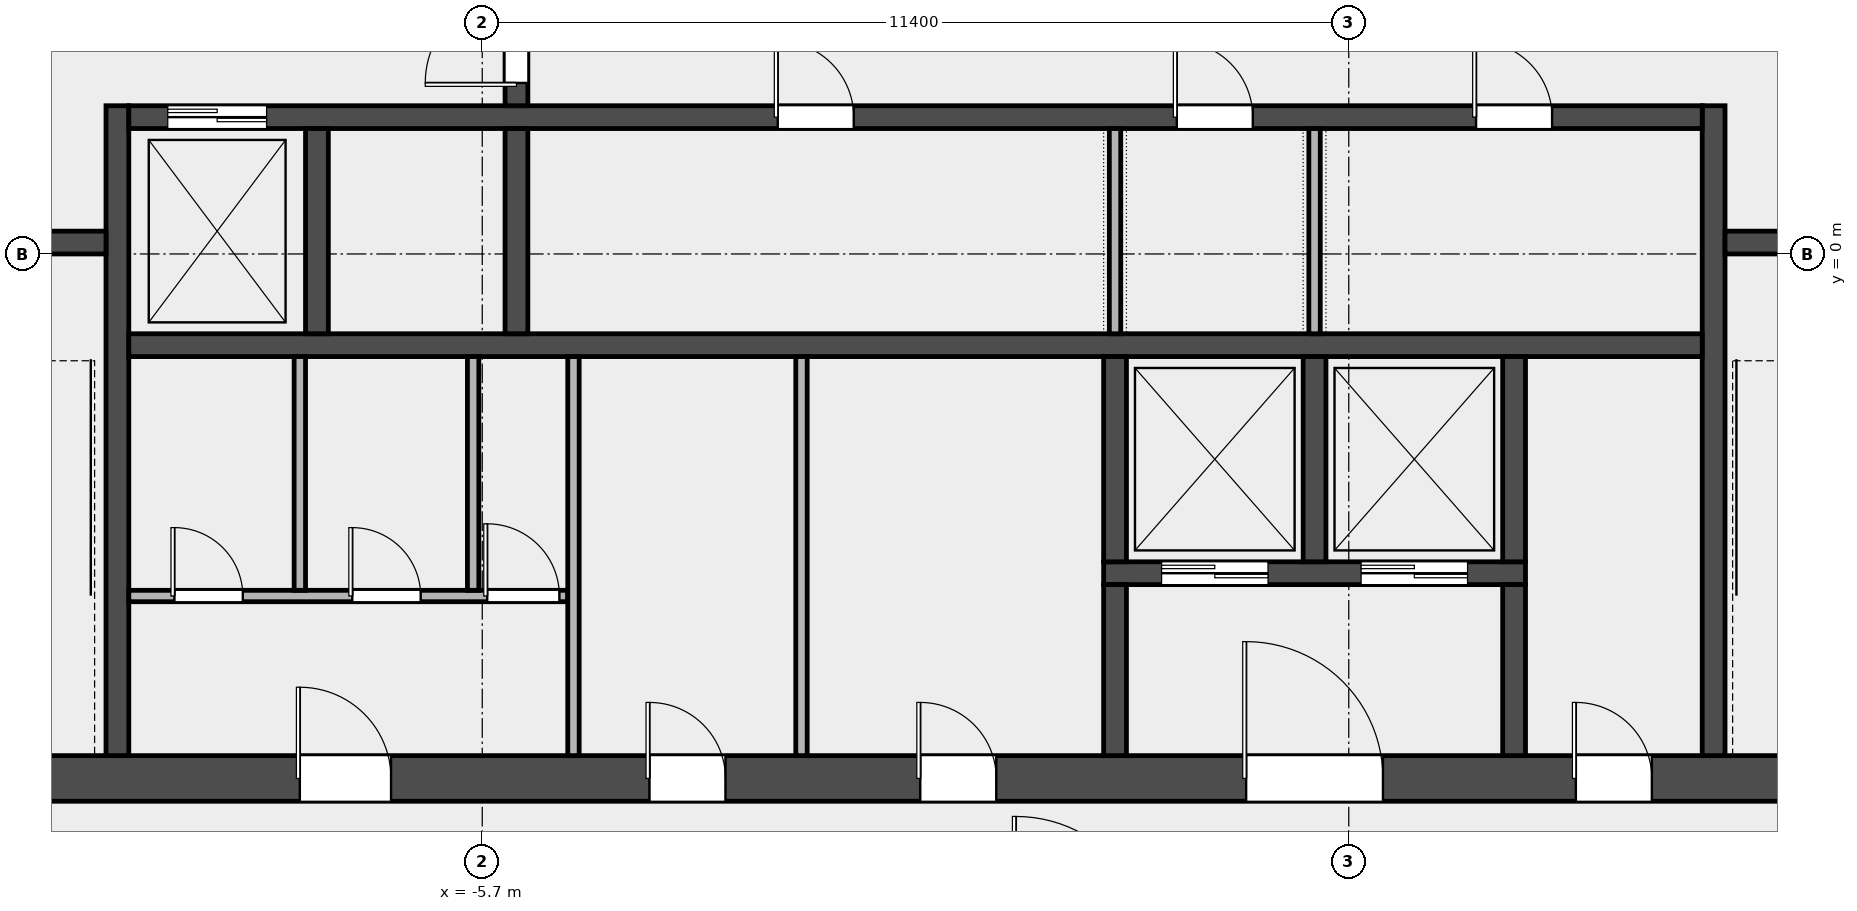
"""IFC4 building model, lengths in metres.
Left out: names, types, materials, properties, quantities, classifications, styles, units other than length and angle.
Written with IfcOpenShell. Run it as: python <this file> out.ifc"""

import sys

from ifc_helpers import new_model, si_unit, direction, frame, frame_2d, origin, place, context, subcontext, project, spatial, rectangle, extrude, element, fill, save


model = new_model("IFC4")
c1 = context("Model", 3, precision=1e-05, world=origin(), true_north=direction((0.0, 1.0)))
c2 = subcontext(c1, "Body", "Model", "MODEL_VIEW")
j1 = project(units=[si_unit("LENGTHUNIT", "METRE"), si_unit("PLANEANGLEUNIT", "RADIAN")], contexts=[c1])
p1 = place(None, origin())
s1 = spatial("IfcSite", under=j1, at=p1, CompositionType="ELEMENT")
p2 = place(p1, origin())
s2 = spatial("IfcBuilding", under=s1, at=p2, CompositionType="ELEMENT")
p3 = place(p2, frame((0.0, 0.0, 255.0)))
s3 = spatial("IfcBuildingStorey", under=s2, at=p3, CompositionType="ELEMENT", Elevation=255.0)
p4 = place(p3, frame((-14.4, -6.9, 0.0), z_axis=(0.0, 0.0, 1.0), x_axis=(1.0, 0.0, 0.0)))
e1 = element("IfcWall", 1, at=p4, inside=s3, PredefinedType="SHEAR", context=c2, shape_type="SweptSolid", body=[
    extrude(rectangle(XDim=28.8, YDim=0.6, at=frame_2d((14.4, 0.0))), origin(), (0.0, 0.0, 1.0), 3.7),
])
p5 = place(p4, frame((6.3, 0.0, 0.0)))
e2 = element("IfcOpeningElement", 2, at=p5, cuts=e1, PredefinedType="OPENING", context=c2, shape_type="SweptSolid", body=[
    extrude(rectangle(XDim=1.2, YDim=2.1, at=frame_2d((0.6, 1.05))), frame((0.0, 0.312, 0.0), z_axis=(0.0, -1.0, 0.0), x_axis=(1.0, 0.0, 0.0)), (0.0, 0.0, 1.0), 0.624),
])
p6 = place(p4, frame((10.9, 0.0, 0.0)))
e3 = element("IfcOpeningElement", 3, at=p6, cuts=e1, PredefinedType="OPENING", context=c2, shape_type="SweptSolid", body=[
    extrude(rectangle(XDim=1.0, YDim=2.1, at=frame_2d((0.5, 1.05))), frame((0.0, 0.312, 0.0), z_axis=(0.0, -1.0, 0.0), x_axis=(1.0, 0.0, 0.0)), (0.0, 0.0, 1.0), 0.624),
])
p7 = place(p4, frame((14.462, 0.0, 0.0)))
e4 = element("IfcOpeningElement", 4, at=p7, cuts=e1, PredefinedType="OPENING", context=c2, shape_type="SweptSolid", body=[
    extrude(rectangle(XDim=1.0, YDim=2.1, at=frame_2d((0.5, 1.05))), frame((0.0, 0.312, 0.0), z_axis=(0.0, -1.0, 0.0), x_axis=(1.0, 0.0, 0.0)), (0.0, 0.0, 1.0), 0.624),
])
p8 = place(p4, frame((18.75, 0.0, 0.0)))
e5 = element("IfcOpeningElement", 5, at=p8, cuts=e1, PredefinedType="OPENING", context=c2, shape_type="SweptSolid", body=[
    extrude(rectangle(XDim=1.8, YDim=2.1, at=frame_2d((0.9, 1.05))), frame((0.0, 0.312, 0.0), z_axis=(0.0, -1.0, 0.0), x_axis=(1.0, 0.0, 0.0)), (0.0, 0.0, 1.0), 0.624),
])
p9 = place(p4, frame((23.087, 0.0, 0.0)))
e6 = element("IfcOpeningElement", 6, at=p9, cuts=e1, PredefinedType="OPENING", context=c2, shape_type="SweptSolid", body=[
    extrude(rectangle(XDim=1.0, YDim=2.1, at=frame_2d((0.5, 1.05))), frame((0.0, 0.312, 0.0), z_axis=(0.0, -1.0, 0.0), x_axis=(1.0, 0.0, 0.0)), (0.0, 0.0, 1.0), 0.624),
])
for number, where, z_axis, x_axis in (
    (7, (-10.5, -6.6, 0.0), (0.0, 0.0, 1.0), (0.0, 1.0, 0.0)),
    (8, (10.5, -6.6, 0.0), (0.0, 0.0, 1.0), (0.0, 1.0, 0.0)),
):
    element("IfcWall", number, at=place(p3, frame(where, z_axis=z_axis, x_axis=x_axis)), inside=s3, PredefinedType="SHEAR", context=c2, shape_type="SweptSolid", body=[
        extrude(rectangle(XDim=8.55, YDim=0.3, at=frame_2d((4.275, 0.0))), origin(), (0.0, 0.0, 1.0), 3.7),
    ])
p10 = place(p3, frame((-13.8, 0.15, 0.0), z_axis=(0.0, 0.0, 1.0), x_axis=(1.0, 0.0, 0.0)))
e9 = element("IfcWall", 9, at=p10, inside=s3, PredefinedType="SOLIDWALL", context=c2, shape_type="SweptSolid", body=[
    extrude(rectangle(XDim=3.15, YDim=0.3, at=frame_2d((1.575, 0.0))), origin(), (0.0, 0.0, 1.0), 3.7),
])
p11 = place(p10, frame((0.975, 0.0, 0.0)))
e10 = element("IfcOpeningElement", 10, at=p11, cuts=e9, PredefinedType="OPENING", context=c2, shape_type="SweptSolid", body=[
    extrude(rectangle(XDim=1.1, YDim=2.1, at=frame_2d((0.55, 1.05))), frame((0.0, 0.162, 0.0), z_axis=(0.0, -1.0, 0.0), x_axis=(1.0, 0.0, 0.0)), (0.0, 0.0, 1.0), 0.324),
])
p12 = place(p3, frame((10.65, 0.15, 0.0), z_axis=(0.0, 0.0, 1.0), x_axis=(1.0, 0.0, 0.0)))
e11 = element("IfcWall", 11, at=p12, inside=s3, PredefinedType="SOLIDWALL", context=c2, shape_type="SweptSolid", body=[
    extrude(rectangle(XDim=3.15, YDim=0.3, at=frame_2d((1.575, 0.0))), origin(), (0.0, 0.0, 1.0), 3.7),
])
p13 = place(p12, frame((1.025, 0.0, 0.0)))
e12 = element("IfcOpeningElement", 12, at=p13, cuts=e11, PredefinedType="OPENING", context=c2, shape_type="SweptSolid", body=[
    extrude(rectangle(XDim=1.1, YDim=2.1, at=frame_2d((0.55, 1.05))), frame((0.0, 0.162, 0.0), z_axis=(0.0, -1.0, 0.0), x_axis=(1.0, 0.0, 0.0)), (0.0, 0.0, 1.0), 0.324),
])
p14 = place(p3, frame((-10.35, -1.2, 0.0), z_axis=(0.0, 0.0, 1.0), x_axis=(1.0, 0.0, 0.0)))
e13 = element("IfcWall", 13, at=p14, inside=s3, PredefinedType="SOLIDWALL", context=c2, shape_type="SweptSolid", body=[
    extrude(rectangle(XDim=20.7, YDim=0.3, at=frame_2d((10.35, 0.0))), origin(), (0.0, 0.0, 1.0), 3.7),
])
p15 = place(p3, frame((-10.35, 1.8, 0.0), z_axis=(0.0, 0.0, 1.0), x_axis=(1.0, 0.0, 0.0)))
e14 = element("IfcWall", 14, at=p15, inside=s3, PredefinedType="SOLIDWALL", context=c2, shape_type="SweptSolid", body=[
    extrude(rectangle(XDim=20.7, YDim=0.3, at=frame_2d((10.35, 0.0))), origin(), (0.0, 0.0, 1.0), 3.7),
])
p16 = place(p15, frame((0.512, 0.0, 0.0)))
e15 = element("IfcOpeningElement", 15, at=p16, cuts=e14, PredefinedType="OPENING", context=c2, shape_type="SweptSolid", body=[
    extrude(rectangle(XDim=1.3, YDim=2.1, at=frame_2d((0.65, 1.05))), frame((0.0, 0.162, 0.0), z_axis=(0.0, -1.0, 0.0), x_axis=(1.0, 0.0, 0.0)), (0.0, 0.0, 1.0), 0.324),
])
p17 = place(p15, frame((8.538, 0.0, 0.0)))
e16 = element("IfcOpeningElement", 16, at=p17, cuts=e14, PredefinedType="OPENING", context=c2, shape_type="SweptSolid", body=[
    extrude(rectangle(XDim=1.0, YDim=2.1, at=frame_2d((0.5, 1.05))), frame((0.0, 0.162, 0.0), z_axis=(0.0, -1.0, 0.0), x_axis=(1.0, 0.0, 0.0)), (0.0, 0.0, 1.0), 0.324),
])
p18 = place(p15, frame((13.788, 0.0, 0.0)))
e17 = element("IfcOpeningElement", 17, at=p18, cuts=e14, PredefinedType="OPENING", context=c2, shape_type="SweptSolid", body=[
    extrude(rectangle(XDim=1.0, YDim=2.1, at=frame_2d((0.5, 1.05))), frame((0.0, 0.162, 0.0), z_axis=(0.0, -1.0, 0.0), x_axis=(1.0, 0.0, 0.0)), (0.0, 0.0, 1.0), 0.324),
])
p19 = place(p15, frame((17.725, 0.0, 0.0)))
e18 = element("IfcOpeningElement", 18, at=p19, cuts=e14, PredefinedType="OPENING", context=c2, shape_type="SweptSolid", body=[
    extrude(rectangle(XDim=1.0, YDim=2.1, at=frame_2d((0.5, 1.05))), frame((0.0, 0.162, 0.0), z_axis=(0.0, -1.0, 0.0), x_axis=(1.0, 0.0, 0.0)), (0.0, 0.0, 1.0), 0.324),
])
for number, where, z_axis, x_axis in (
    (19, (-7.875, -1.05, 0.0), (0.0, 0.0, 1.0), (0.0, 1.0, 0.0)),
    (20, (-5.25, -1.05, 0.0), (0.0, 0.0, 1.0), (0.0, 1.0, 0.0)),
):
    element("IfcWall", number, at=place(p3, frame(where, z_axis=z_axis, x_axis=x_axis)), inside=s3, PredefinedType="SOLIDWALL", context=c2, shape_type="SweptSolid", body=[
        extrude(rectangle(XDim=2.7, YDim=0.3, at=frame_2d((1.35, 0.0))), origin(), (0.0, 0.0, 1.0), 3.7),
    ])
p20 = place(p3, frame((-5.25, 1.95, 0.0), z_axis=(0.0, 0.0, 1.0), x_axis=(0.0, 1.0, 0.0)))
e21 = element("IfcWall", 21, at=p20, inside=s3, PredefinedType="SOLIDWALL", context=c2, shape_type="SweptSolid", body=[
    extrude(rectangle(XDim=3.3, YDim=0.3, at=frame_2d((1.65, 0.0))), origin(), (0.0, 0.0, 1.0), 3.7),
])
p21 = place(p20, frame((0.3, 0.0, 0.0)))
e22 = element("IfcOpeningElement", 22, at=p21, cuts=e21, PredefinedType="OPENING", context=c2, shape_type="SweptSolid", body=[
    extrude(rectangle(XDim=1.2, YDim=2.1, at=frame_2d((0.6, 1.05))), frame((0.0, 0.162, 0.0), z_axis=(0.0, -1.0, 0.0), x_axis=(1.0, 0.0, 0.0)), (0.0, 0.0, 1.0), 0.324),
])
p22 = place(p20, frame((1.8, 0.0, 0.0)))
e23 = element("IfcOpeningElement", 23, at=p22, cuts=e21, PredefinedType="OPENING", context=c2, shape_type="SweptSolid", body=[
    extrude(rectangle(XDim=1.2, YDim=2.1, at=frame_2d((0.6, 1.05))), frame((0.0, 0.162, 0.0), z_axis=(0.0, -1.0, 0.0), x_axis=(1.0, 0.0, 0.0)), (0.0, 0.0, 1.0), 0.324),
])
p23 = place(p3, frame((2.475, -4.2, 0.0), z_axis=(0.0, 0.0, 1.0), x_axis=(1.0, 0.0, 0.0)))
e24 = element("IfcWall", 24, at=p23, inside=s3, PredefinedType="SOLIDWALL", context=c2, shape_type="SweptSolid", body=[
    extrude(rectangle(XDim=5.55, YDim=0.3, at=frame_2d((2.775, 0.0))), origin(), (0.0, 0.0, 1.0), 3.7),
])
p24 = place(p23, frame((0.762, 0.0, 0.0)))
e25 = element("IfcOpeningElement", 25, at=p24, cuts=e24, PredefinedType="OPENING", context=c2, shape_type="SweptSolid", body=[
    extrude(rectangle(XDim=1.4, YDim=2.1, at=frame_2d((0.7, 1.05))), frame((0.0, 0.162, 0.0), z_axis=(0.0, -1.0, 0.0), x_axis=(1.0, 0.0, 0.0)), (0.0, 0.0, 1.0), 0.324),
])
p25 = place(p23, frame((3.387, 0.0, 0.0)))
e26 = element("IfcOpeningElement", 26, at=p25, cuts=e24, PredefinedType="OPENING", context=c2, shape_type="SweptSolid", body=[
    extrude(rectangle(XDim=1.4, YDim=2.1, at=frame_2d((0.7, 1.05))), frame((0.0, 0.162, 0.0), z_axis=(0.0, -1.0, 0.0), x_axis=(1.0, 0.0, 0.0)), (0.0, 0.0, 1.0), 0.324),
])
p26 = place(p3, frame((2.625, -4.05, 0.0), z_axis=(0.0, 0.0, 1.0), x_axis=(0.0, 1.0, 0.0)))
e27 = element("IfcWall", 27, at=p26, inside=s3, PredefinedType="SOLIDWALL", context=c2, shape_type="SweptSolid", body=[
    extrude(rectangle(XDim=2.7, YDim=0.3, at=frame_2d((1.35, 0.0))), origin(), (0.0, 0.0, 1.0), 3.7),
])
p27 = place(p3, frame((2.625, -6.6, 0.0), z_axis=(0.0, 0.0, 1.0), x_axis=(0.0, 1.0, 0.0)))
e28 = element("IfcWall", 28, at=p27, inside=s3, PredefinedType="SOLIDWALL", context=c2, shape_type="SweptSolid", body=[
    extrude(rectangle(XDim=2.25, YDim=0.3, at=frame_2d((1.125, 0.0))), origin(), (0.0, 0.0, 1.0), 3.7),
])
for number, where, z_axis, x_axis in (
    (29, (5.25, -4.05, 0.0), (0.0, 0.0, 1.0), (0.0, 1.0, 0.0)),
    (30, (7.875, -4.05, 0.0), (0.0, 0.0, 1.0), (0.0, 1.0, 0.0)),
):
    element("IfcWall", number, at=place(p3, frame(where, z_axis=z_axis, x_axis=x_axis)), inside=s3, PredefinedType="SOLIDWALL", context=c2, shape_type="SweptSolid", body=[
        extrude(rectangle(XDim=2.7, YDim=0.3, at=frame_2d((1.35, 0.0))), origin(), (0.0, 0.0, 1.0), 3.7),
    ])
p28 = place(p3, frame((7.875, -6.6, 0.0), z_axis=(0.0, 0.0, 1.0), x_axis=(0.0, 1.0, 0.0)))
e31 = element("IfcWall", 31, at=p28, inside=s3, PredefinedType="SOLIDWALL", context=c2, shape_type="SweptSolid", body=[
    extrude(rectangle(XDim=2.25, YDim=0.3, at=frame_2d((1.125, 0.0))), origin(), (0.0, 0.0, 1.0), 3.7),
])
p29 = place(p3, frame((-10.35, -4.5, 0.0), z_axis=(0.0, 0.0, 1.0), x_axis=(1.0, 0.0, 0.0)))
e32 = element("IfcWall", 32, at=p29, inside=s3, PredefinedType="PARTITIONING", context=c2, shape_type="SweptSolid", body=[
    extrude(rectangle(XDim=5.775, YDim=0.15, at=frame_2d((2.888, 0.0))), origin(), (0.0, 0.0, 1.0), 3.7),
])
p30 = place(p29, frame((0.6, 0.0, 0.0)))
e33 = element("IfcOpeningElement", 33, at=p30, cuts=e32, PredefinedType="OPENING", context=c2, shape_type="SweptSolid", body=[
    extrude(rectangle(XDim=0.9, YDim=2.1, at=frame_2d((0.45, 1.05))), frame((0.0, 0.087, 0.0), z_axis=(0.0, -1.0, 0.0), x_axis=(1.0, 0.0, 0.0)), (0.0, 0.0, 1.0), 0.174),
])
p31 = place(p29, frame((2.94, 0.0, 0.0)))
e34 = element("IfcOpeningElement", 34, at=p31, cuts=e32, PredefinedType="OPENING", context=c2, shape_type="SweptSolid", body=[
    extrude(rectangle(XDim=0.9, YDim=2.1, at=frame_2d((0.45, 1.05))), frame((0.0, 0.087, 0.0), z_axis=(0.0, -1.0, 0.0), x_axis=(1.0, 0.0, 0.0)), (0.0, 0.0, 1.0), 0.174),
])
p32 = place(p29, frame((4.715, 0.0, 0.0)))
e35 = element("IfcOpeningElement", 35, at=p32, cuts=e32, PredefinedType="OPENING", context=c2, shape_type="SweptSolid", body=[
    extrude(rectangle(XDim=0.95, YDim=2.1, at=frame_2d((0.475, 1.05))), frame((0.0, 0.087, 0.0), z_axis=(0.0, -1.0, 0.0), x_axis=(1.0, 0.0, 0.0)), (0.0, 0.0, 1.0), 0.174),
])
for number, where, z_axis, x_axis in (
    (36, (-8.1, -4.425, 0.0), (0.0, 0.0, 1.0), (0.0, 1.0, 0.0)),
    (37, (-5.82, -4.425, 0.0), (0.0, 0.0, 1.0), (0.0, 1.0, 0.0)),
):
    element("IfcWall", number, at=place(p3, frame(where, z_axis=z_axis, x_axis=x_axis)), inside=s3, PredefinedType="PARTITIONING", context=c2, shape_type="SweptSolid", body=[
        extrude(rectangle(XDim=3.075, YDim=0.15, at=frame_2d((1.538, 0.0))), origin(), (0.0, 0.0, 1.0), 3.7),
    ])
for number, where, z_axis, x_axis in (
    (38, (-4.5, -6.6, 0.0), (0.0, 0.0, 1.0), (0.0, 1.0, 0.0)),
    (39, (-1.5, -6.6, 0.0), (0.0, 0.0, 1.0), (0.0, 1.0, 0.0)),
):
    element("IfcWall", number, at=place(p3, frame(where, z_axis=z_axis, x_axis=x_axis)), inside=s3, PredefinedType="PARTITIONING", context=c2, shape_type="SweptSolid", body=[
        extrude(rectangle(XDim=5.25, YDim=0.15, at=frame_2d((2.625, 0.0))), origin(), (0.0, 0.0, 1.0), 3.7),
    ])
for number, where, z_axis, x_axis in (
    (40, (2.625, -1.05, 0.0), (0.0, 0.0, 1.0), (0.0, 1.0, 0.0)),
    (41, (5.25, -1.05, 0.0), (0.0, 0.0, 1.0), (0.0, 1.0, 0.0)),
):
    element("IfcWall", number, at=place(p3, frame(where, z_axis=z_axis, x_axis=x_axis)), inside=s3, PredefinedType="PARTITIONING", context=c2, shape_type="SweptSolid", body=[
        extrude(rectangle(XDim=2.7, YDim=0.15, at=frame_2d((1.35, 0.0))), origin(), (0.0, 0.0, 1.0), 3.7),
    ])
p33 = place(p21, origin())
e42 = element("IfcDoor", 42, at=p33, inside=s3, OperationType="SINGLE_SWING_LEFT", PredefinedType="DOOR", context=c2, shape_type="SweptSolid", body=[
    extrude(rectangle(XDim=1.2, YDim=2.1, at=frame_2d((0.6, 1.05))), frame((0.0, 0.025, 0.0), z_axis=(0.0, -1.0, 0.0), x_axis=(1.0, 0.0, 0.0)), (0.0, 0.0, 1.0), 0.05),
])
fill(e22, e42)
p34 = place(p16, origin())
e43 = element("IfcDoor", 43, at=p34, inside=s3, OperationType="DOUBLE_DOOR_SLIDING", PredefinedType="DOOR", context=c2, shape_type="SweptSolid", body=[
    extrude(rectangle(XDim=1.3, YDim=2.1, at=frame_2d((0.65, 1.05))), frame((0.0, 0.025, 0.0), z_axis=(0.0, -1.0, 0.0), x_axis=(1.0, 0.0, 0.0)), (0.0, 0.0, 1.0), 0.05),
])
fill(e15, e43)
p35 = place(p24, origin())
e44 = element("IfcDoor", 44, at=p35, inside=s3, OperationType="DOUBLE_DOOR_SLIDING", PredefinedType="DOOR", context=c2, shape_type="SweptSolid", body=[
    extrude(rectangle(XDim=1.4, YDim=2.1, at=frame_2d((0.7, 1.05))), frame((0.0, 0.025, 0.0), z_axis=(0.0, -1.0, 0.0), x_axis=(1.0, 0.0, 0.0)), (0.0, 0.0, 1.0), 0.05),
])
fill(e25, e44)
p36 = place(p25, origin())
e45 = element("IfcDoor", 45, at=p36, inside=s3, OperationType="DOUBLE_DOOR_SLIDING", PredefinedType="DOOR", context=c2, shape_type="SweptSolid", body=[
    extrude(rectangle(XDim=1.4, YDim=2.1, at=frame_2d((0.7, 1.05))), frame((0.0, 0.025, 0.0), z_axis=(0.0, -1.0, 0.0), x_axis=(1.0, 0.0, 0.0)), (0.0, 0.0, 1.0), 0.05),
])
fill(e26, e45)
p37 = place(p5, origin())
e46 = element("IfcDoor", 46, at=p37, inside=s3, OperationType="SINGLE_SWING_LEFT", PredefinedType="DOOR", context=c2, shape_type="SweptSolid", body=[
    extrude(rectangle(XDim=1.2, YDim=2.1, at=frame_2d((0.6, 1.05))), frame((0.0, 0.025, 0.0), z_axis=(0.0, -1.0, 0.0), x_axis=(1.0, 0.0, 0.0)), (0.0, 0.0, 1.0), 0.05),
])
fill(e2, e46)
p38 = place(p30, origin())
e47 = element("IfcDoor", 47, at=p38, inside=s3, OperationType="SINGLE_SWING_LEFT", PredefinedType="DOOR", context=c2, shape_type="SweptSolid", body=[
    extrude(rectangle(XDim=0.9, YDim=2.1, at=frame_2d((0.45, 1.05))), frame((0.0, 0.025, 0.0), z_axis=(0.0, -1.0, 0.0), x_axis=(1.0, 0.0, 0.0)), (0.0, 0.0, 1.0), 0.05),
])
fill(e33, e47)
p39 = place(p31, origin())
e48 = element("IfcDoor", 48, at=p39, inside=s3, OperationType="SINGLE_SWING_LEFT", PredefinedType="DOOR", context=c2, shape_type="SweptSolid", body=[
    extrude(rectangle(XDim=0.9, YDim=2.1, at=frame_2d((0.45, 1.05))), frame((0.0, 0.025, 0.0), z_axis=(0.0, -1.0, 0.0), x_axis=(1.0, 0.0, 0.0)), (0.0, 0.0, 1.0), 0.05),
])
fill(e34, e48)
p40 = place(p32, origin())
e49 = element("IfcDoor", 49, at=p40, inside=s3, OperationType="SINGLE_SWING_LEFT", PredefinedType="DOOR", context=c2, shape_type="SweptSolid", body=[
    extrude(rectangle(XDim=0.95, YDim=2.1, at=frame_2d((0.475, 1.05))), frame((0.0, 0.025, 0.0), z_axis=(0.0, -1.0, 0.0), x_axis=(1.0, 0.0, 0.0)), (0.0, 0.0, 1.0), 0.05),
])
fill(e35, e49)
p41 = place(p6, origin())
e50 = element("IfcDoor", 50, at=p41, inside=s3, OperationType="SINGLE_SWING_LEFT", PredefinedType="DOOR", context=c2, shape_type="SweptSolid", body=[
    extrude(rectangle(XDim=1.0, YDim=2.1, at=frame_2d((0.5, 1.05))), frame((0.0, 0.025, 0.0), z_axis=(0.0, -1.0, 0.0), x_axis=(1.0, 0.0, 0.0)), (0.0, 0.0, 1.0), 0.05),
])
fill(e3, e50)
p42 = place(p7, origin())
e51 = element("IfcDoor", 51, at=p42, inside=s3, OperationType="SINGLE_SWING_LEFT", PredefinedType="DOOR", context=c2, shape_type="SweptSolid", body=[
    extrude(rectangle(XDim=1.0, YDim=2.1, at=frame_2d((0.5, 1.05))), frame((0.0, 0.025, 0.0), z_axis=(0.0, -1.0, 0.0), x_axis=(1.0, 0.0, 0.0)), (0.0, 0.0, 1.0), 0.05),
])
fill(e4, e51)
p43 = place(p8, origin())
e52 = element("IfcDoor", 52, at=p43, inside=s3, OperationType="DOUBLE_DOOR_SINGLE_SWING", PredefinedType="DOOR", context=c2, shape_type="SweptSolid", body=[
    extrude(rectangle(XDim=1.8, YDim=2.1, at=frame_2d((0.9, 1.05))), frame((0.0, 0.025, 0.0), z_axis=(0.0, -1.0, 0.0), x_axis=(1.0, 0.0, 0.0)), (0.0, 0.0, 1.0), 0.05),
])
fill(e5, e52)
p44 = place(p9, origin())
e53 = element("IfcDoor", 53, at=p44, inside=s3, OperationType="SINGLE_SWING_LEFT", PredefinedType="DOOR", context=c2, shape_type="SweptSolid", body=[
    extrude(rectangle(XDim=1.0, YDim=2.1, at=frame_2d((0.5, 1.05))), frame((0.0, 0.025, 0.0), z_axis=(0.0, -1.0, 0.0), x_axis=(1.0, 0.0, 0.0)), (0.0, 0.0, 1.0), 0.05),
])
fill(e6, e53)
p45 = place(p17, origin())
e54 = element("IfcDoor", 54, at=p45, inside=s3, OperationType="SINGLE_SWING_LEFT", PredefinedType="DOOR", context=c2, shape_type="SweptSolid", body=[
    extrude(rectangle(XDim=1.0, YDim=2.1, at=frame_2d((0.5, 1.05))), frame((0.0, 0.025, 0.0), z_axis=(0.0, -1.0, 0.0), x_axis=(1.0, 0.0, 0.0)), (0.0, 0.0, 1.0), 0.05),
])
fill(e16, e54)
p46 = place(p18, origin())
e55 = element("IfcDoor", 55, at=p46, inside=s3, OperationType="SINGLE_SWING_LEFT", PredefinedType="DOOR", context=c2, shape_type="SweptSolid", body=[
    extrude(rectangle(XDim=1.0, YDim=2.1, at=frame_2d((0.5, 1.05))), frame((0.0, 0.025, 0.0), z_axis=(0.0, -1.0, 0.0), x_axis=(1.0, 0.0, 0.0)), (0.0, 0.0, 1.0), 0.05),
])
fill(e17, e55)
p47 = place(p19, origin())
e56 = element("IfcDoor", 56, at=p47, inside=s3, OperationType="SINGLE_SWING_LEFT", PredefinedType="DOOR", context=c2, shape_type="SweptSolid", body=[
    extrude(rectangle(XDim=1.0, YDim=2.1, at=frame_2d((0.5, 1.05))), frame((0.0, 0.025, 0.0), z_axis=(0.0, -1.0, 0.0), x_axis=(1.0, 0.0, 0.0)), (0.0, 0.0, 1.0), 0.05),
])
fill(e18, e56)
save(model, sys.argv[1])
